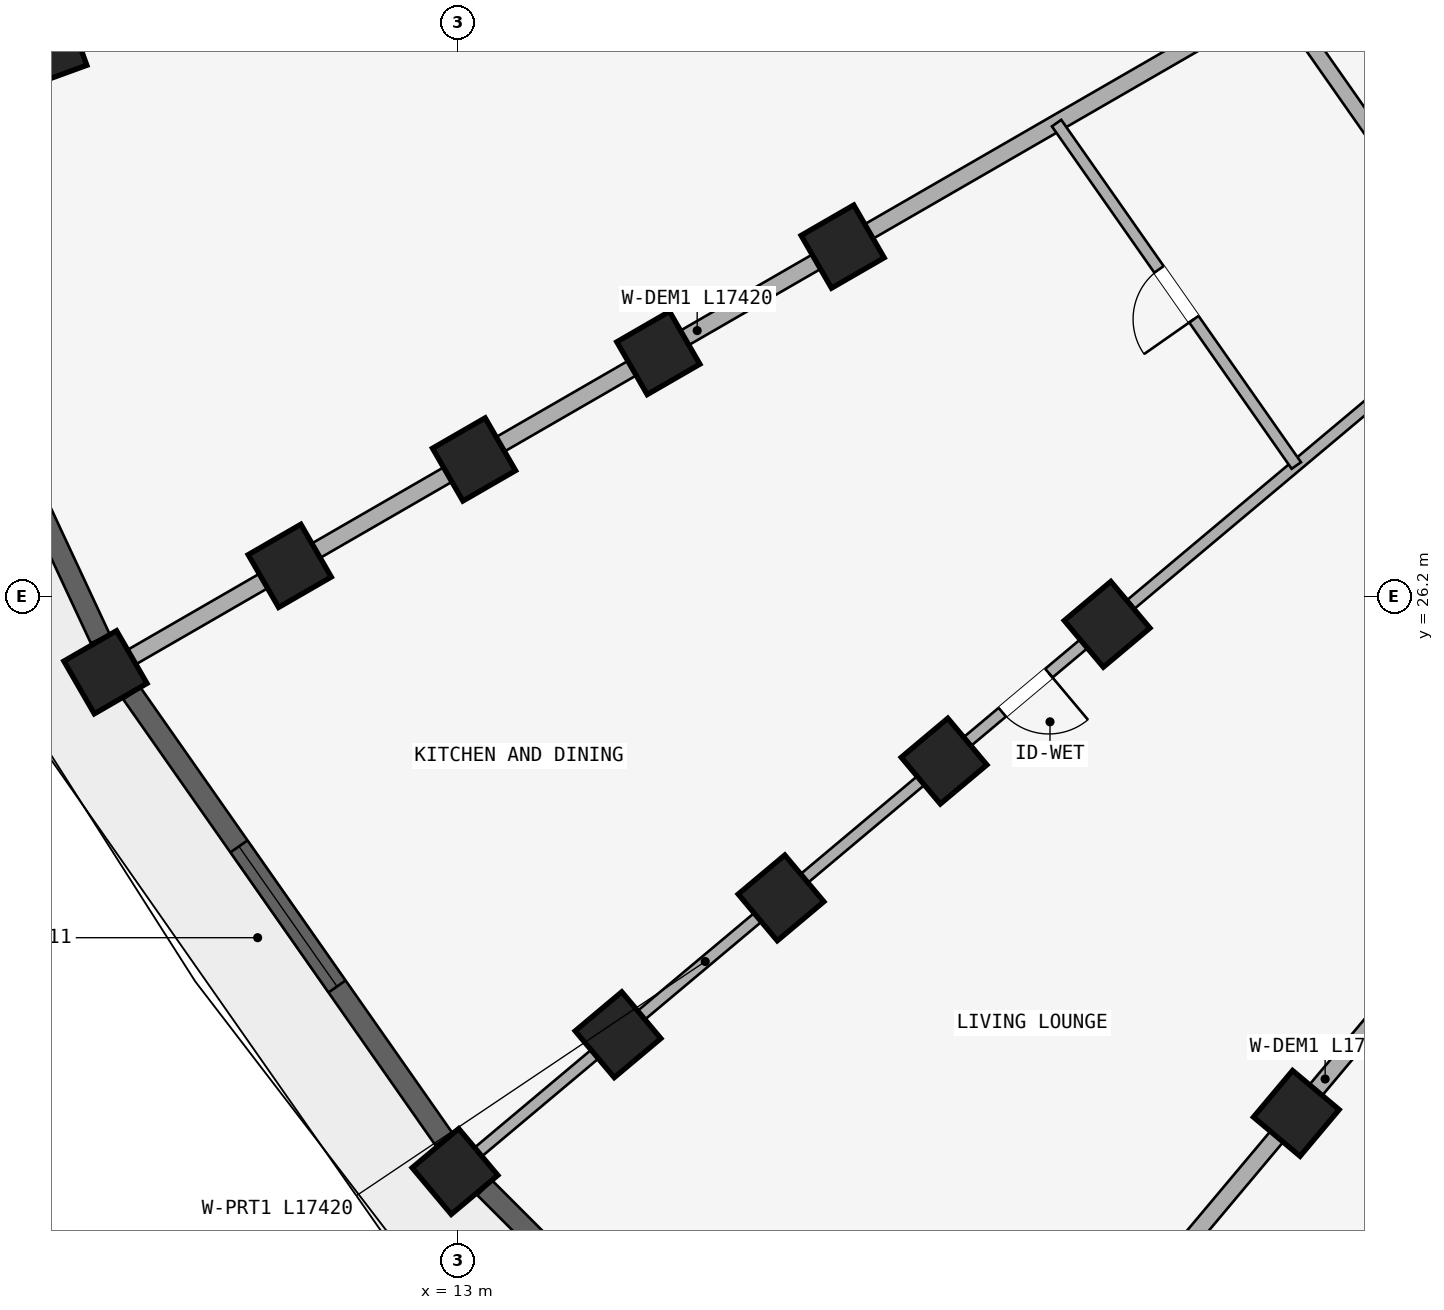
"""IFC4 building model, lengths in metres.
Left out: names, types, materials, properties, quantities, classifications, styles, units other than length and angle.
Written with IfcOpenShell. Run it as: python <this file> out.ifc"""

import sys

from ifc_helpers import new_model, si_unit, direction, frame, frame_2d, origin, origin_2d, place, context, subcontext, project, spatial, rectangle, extrude, element, fill, save


model = new_model("IFC4")
c1 = context("Model", 3, precision=1e-05, world=origin(), true_north=direction((0.0, 1.0)))
c2 = subcontext(c1, "Body", "Model", "MODEL_VIEW")
j1 = project(units=[si_unit("LENGTHUNIT", "METRE"), si_unit("PLANEANGLEUNIT", "RADIAN")], contexts=[c1])
p1 = place(None, origin())
s1 = spatial("IfcSite", under=j1, at=p1, CompositionType="ELEMENT")
p2 = place(p1, origin())
s2 = spatial("IfcBuilding", under=s1, at=p2, CompositionType="ELEMENT")
p3 = place(p2, frame((0.0, 0.0, 15.0)))
s3 = spatial("IfcBuildingStorey", under=s2, at=p3, CompositionType="ELEMENT", Elevation=15.0)
for number, where, z_axis, x_axis in (
    (1, (24.031, 19.397, 0.0), (0.0, 0.0, 1.0), (-0.766, 0.643, 0.0)),
    (2, (21.542, 25.831, 0.0), (0.0, 0.0, 1.0), (-0.643, 0.766, 0.0)),
    (3, (19.397, 24.031, 0.0), (0.0, 0.0, 1.0), (-0.643, 0.766, 0.0)),
    (4, (17.252, 22.231, 0.0), (0.0, 0.0, 1.0), (-0.643, 0.766, 0.0)),
    (5, (15.107, 20.432, 0.0), (0.0, 0.0, 1.0), (-0.643, 0.766, 0.0)),
    (6, (12.962, 18.632, 0.0), (0.0, 0.0, 1.0), (-0.643, 0.766, 0.0)),
    (7, (18.062, 30.8, 0.0), (0.0, 0.0, 1.0), (-0.5, 0.866, 0.0)),
    (8, (15.637, 29.4, 0.0), (0.0, 0.0, 1.0), (-0.5, 0.866, 0.0)),
    (9, (13.213, 28.0, 0.0), (0.0, 0.0, 1.0), (-0.5, 0.866, 0.0)),
    (10, (10.788, 26.6, 0.0), (0.0, 0.0, 1.0), (-0.5, 0.866, 0.0)),
    (11, (8.363, 25.2, 0.0), (0.0, 0.0, 1.0), (-0.5, 0.866, 0.0)),
    (12, (7.605, 33.425, 0.0), (0.0, 0.0, 1.0), (-0.342, 0.94, 0.0)),
):
    element("IfcColumn", number, at=place(p3, frame(where, z_axis=z_axis, x_axis=x_axis)), inside=s3, PredefinedType="COLUMN", context=c2, shape_type="SweptSolid", body=[
        extrude(rectangle(XDim=0.8, YDim=0.8, at=origin_2d()), origin(), (0.0, 0.0, 1.0), 2.93),
    ])
p4 = place(p3, frame((26.598, 30.073, 0.0), z_axis=(0.0, 0.0, 1.0), x_axis=(-0.573592335331, 0.819140911474, 0.0)))
e13 = element("IfcWall", 13, at=p4, inside=s3, PredefinedType="STANDARD", context=c2, shape_type="SweptSolid", body=[
    extrude(rectangle(XDim=4.916, YDim=0.2, at=frame_2d((2.458, 0.0))), origin(), (0.0, 0.0, 1.0), 2.372),
])
p5 = place(p3, frame((30.009, 26.521, 0.0), z_axis=(0.0, 0.0, 1.0), x_axis=(-0.642784757967, -0.766046835987, 0.0)))
e14 = element("IfcWall", 14, at=p5, inside=s3, PredefinedType="STANDARD", context=c2, shape_type="SweptSolid", body=[
    extrude(rectangle(XDim=17.42, YDim=0.22, at=frame_2d((8.71, 0.0))), origin(), (0.0, 0.0, 1.0), 2.372),
])
p6 = place(p3, frame((26.521, 30.009, 0.0), z_axis=(0.0, 0.0, 1.0), x_axis=(-0.766046835987, -0.642784757967, 0.0)))
e15 = element("IfcWall", 15, at=p6, inside=s3, PredefinedType="PARTITIONING", context=c2, shape_type="SweptSolid", body=[
    extrude(rectangle(XDim=17.42, YDim=0.15, at=frame_2d((8.71, 0.0))), origin(), (0.0, 0.0, 1.0), 2.372),
])
p7 = place(p6, frame((7.5, 0.0, 0.0)))
e16 = element("IfcOpeningElement", 16, at=p7, cuts=e15, PredefinedType="OPENING", context=c2, shape_type="SweptSolid", body=[
    extrude(rectangle(XDim=0.8, YDim=2.1, at=frame_2d((0.4, 1.05))), frame((0.0, 0.085, 0.0), z_axis=(0.0, -1.0, 0.0), x_axis=(1.0, 0.0, 0.0)), (0.0, 0.0, 1.0), 0.17),
])
p8 = place(p3, frame((23.691, 34.05, 0.0), z_axis=(0.0, 0.0, 1.0), x_axis=(-0.866026648973, -0.499997843263, 0.0)))
e17 = element("IfcWall", 17, at=p8, inside=s3, PredefinedType="STANDARD", context=c2, shape_type="SweptSolid", body=[
    extrude(rectangle(XDim=17.42, YDim=0.22, at=frame_2d((8.71, 0.0))), origin(), (0.0, 0.0, 1.0), 2.372),
])
p9 = place(p3, frame((21.607, 38.521, 0.0), z_axis=(0.0, 0.0, 1.0), x_axis=(-0.939691901159, -0.342022120477, 0.0)))
e18 = element("IfcWall", 18, at=p9, inside=s3, PredefinedType="PARTITIONING", context=c2, shape_type="SweptSolid", body=[
    extrude(rectangle(XDim=17.42, YDim=0.15, at=frame_2d((8.71, 0.0))), origin(), (0.0, 0.0, 1.0), 2.372),
])
p10 = place(p9, frame((7.5, 0.0, 0.0)))
e19 = element("IfcOpeningElement", 19, at=p10, cuts=e18, PredefinedType="OPENING", context=c2, shape_type="SweptSolid", body=[
    extrude(rectangle(XDim=0.8, YDim=2.1, at=frame_2d((0.4, 1.05))), frame((0.0, 0.085, 0.0), z_axis=(0.0, -1.0, 0.0), x_axis=(1.0, 0.0, 0.0)), (0.0, 0.0, 1.0), 0.17),
])
p11 = place(p3, frame((24.031, 27.92, 0.0), z_axis=(0.0, 0.0, 1.0), x_axis=(-0.573569599955, 0.819156831143, 0.0)))
e20 = element("IfcWall", 20, at=p11, inside=s3, PredefinedType="PLUMBINGWALL", context=c2, shape_type="SweptSolid", body=[
    extrude(rectangle(XDim=5.5, YDim=0.15, at=frame_2d((2.75, 0.0))), origin(), (0.0, 0.0, 1.0), 2.372),
])
p12 = place(p11, frame((2.35, 0.0, 0.0)))
e21 = element("IfcOpeningElement", 21, at=p12, cuts=e20, PredefinedType="OPENING", context=c2, shape_type="SweptSolid", body=[
    extrude(rectangle(XDim=0.8, YDim=2.1, at=frame_2d((0.4, 1.05))), frame((0.0, 0.085, 0.0), z_axis=(0.0, -1.0, 0.0), x_axis=(1.0, 0.0, 0.0)), (0.0, 0.0, 1.0), 0.17),
])
p13 = place(p3, frame((18.418, 13.352, 0.0), z_axis=(0.0, 0.0, 1.0), x_axis=(-0.707106781187, 0.707106781187, 0.0)))
e22 = element("IfcWall", 22, at=p13, inside=s3, PredefinedType="STANDARD", context=c2, shape_type="SweptSolid", body=[
    extrude(rectangle(XDim=7.164, YDim=0.275, at=frame_2d((3.582, 0.0))), origin(), (0.0, 0.0, 1.0), 2.472),
])
p14 = place(p13, frame((4.69, 0.0, 0.522)))
e23 = element("IfcOpeningElement", 23, at=p14, cuts=e22, PredefinedType="OPENING", context=c2, shape_type="SweptSolid", body=[
    extrude(rectangle(XDim=1.2, YDim=1.5, at=frame_2d((0.6, 0.75))), frame((0.0, 0.147, 0.0), z_axis=(0.0, -1.0, 0.0), x_axis=(1.0, 0.0, 0.0)), (0.0, 0.0, 1.0), 0.295),
])
p15 = place(p13, frame((1.877, 0.0, 0.0)))
e24 = element("IfcOpeningElement", 24, at=p15, cuts=e22, PredefinedType="OPENING", context=c2, shape_type="SweptSolid", body=[
    extrude(rectangle(XDim=1.26, YDim=2.15, at=frame_2d((0.63, 1.075))), frame((0.0, 0.147, 0.0), z_axis=(0.0, -1.0, 0.0), x_axis=(1.0, 0.0, 0.0)), (0.0, 0.0, 1.0), 0.295),
])
p16 = place(p3, frame((12.819, 19.053, 0.0), z_axis=(0.0, 0.0, 1.0), x_axis=(-0.573562972382, 0.819161471697, 0.0)))
e25 = element("IfcWall", 25, at=p16, inside=s3, PredefinedType="STANDARD", context=c2, shape_type="SweptSolid", body=[
    extrude(rectangle(XDim=7.164, YDim=0.275, at=frame_2d((3.582, 0.0))), origin(), (0.0, 0.0, 1.0), 2.472),
])
p17 = place(p16, frame((2.457, 0.0, 0.322)))
e26 = element("IfcOpeningElement", 26, at=p17, cuts=e25, PredefinedType="OPENING", context=c2, shape_type="SweptSolid", body=[
    extrude(rectangle(XDim=2.25, YDim=1.95, at=frame_2d((1.125, 0.975))), frame((0.0, 0.147, 0.0), z_axis=(0.0, -1.0, 0.0), x_axis=(1.0, 0.0, 0.0)), (0.0, 0.0, 1.0), 0.295),
])
p18 = place(p3, frame((8.296, 25.64, 0.0), z_axis=(0.0, 0.0, 1.0), x_axis=(-0.422633596215, 0.906300636296, 0.0)))
e27 = element("IfcWall", 27, at=p18, inside=s3, PredefinedType="STANDARD", context=c2, shape_type="SweptSolid", body=[
    extrude(rectangle(XDim=7.164, YDim=0.275, at=frame_2d((3.582, 0.0))), origin(), (0.0, 0.0, 1.0), 2.472),
])
p19 = place(p18, frame((2.532, 0.0, 0.472)))
e28 = element("IfcOpeningElement", 28, at=p19, cuts=e27, PredefinedType="OPENING", context=c2, shape_type="SweptSolid", body=[
    extrude(rectangle(XDim=2.1, YDim=1.8, at=frame_2d((1.05, 0.9))), frame((0.0, 0.147, 0.0), z_axis=(0.0, -1.0, 0.0), x_axis=(1.0, 0.0, 0.0)), (0.0, 0.0, 1.0), 0.295),
])
p20 = place(p17, origin())
e29 = element("IfcWindow", 29, at=p20, inside=s3, PartitioningType="TRIPLE_PANEL_VERTICAL", PredefinedType="WINDOW", context=c2, shape_type="SweptSolid", body=[
    extrude(rectangle(XDim=2.25, YDim=1.95, at=frame_2d((1.125, 0.975))), frame((0.0, 0.03, 0.0), z_axis=(0.0, -1.0, 0.0), x_axis=(1.0, 0.0, 0.0)), (0.0, 0.0, 1.0), 0.06),
])
fill(e26, e29)
p21 = place(p7, frame((0.8, 0.0, 0.0), z_axis=(0.0, 0.0, 1.0), x_axis=(-1.0, 0.0, 0.0)))
e30 = element("IfcDoor", 30, at=p21, inside=s3, OperationType="SINGLE_SWING_RIGHT", PredefinedType="DOOR", context=c2, shape_type="SweptSolid", body=[
    extrude(rectangle(XDim=0.8, YDim=2.1, at=frame_2d((0.4, 1.05))), frame((0.0, 0.025, 0.0), z_axis=(0.0, -1.0, 0.0), x_axis=(1.0, 0.0, 0.0)), (0.0, 0.0, 1.0), 0.05),
])
fill(e16, e30)
p22 = place(p12, origin())
e31 = element("IfcDoor", 31, at=p22, inside=s3, OperationType="SINGLE_SWING_LEFT", PredefinedType="DOOR", context=c2, shape_type="SweptSolid", body=[
    extrude(rectangle(XDim=0.8, YDim=2.1, at=frame_2d((0.4, 1.05))), frame((0.0, 0.025, 0.0), z_axis=(0.0, -1.0, 0.0), x_axis=(1.0, 0.0, 0.0)), (0.0, 0.0, 1.0), 0.05),
])
fill(e21, e31)
save(model, sys.argv[1])
